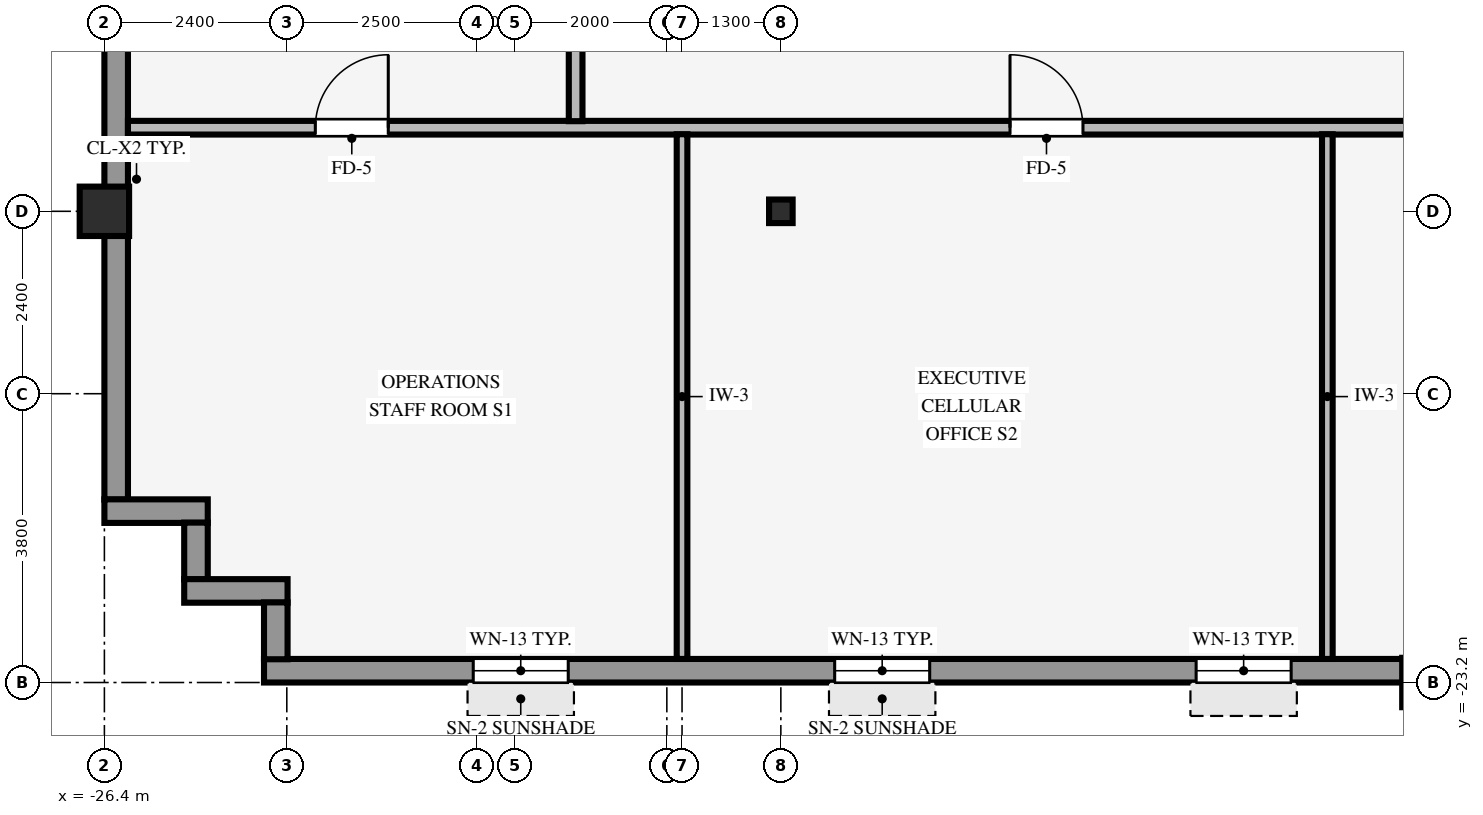
"""IFC4 building model, lengths in metres.
Left out: names, types, materials, properties, quantities, classifications, styles, units other than length and angle.
Written with IfcOpenShell. Run it as: python <this file> out.ifc"""

import sys

from ifc_helpers import new_model, si_unit, direction, frame, frame_2d, origin, origin_2d, place, context, subcontext, project, spatial, rectangle, hollow_rectangle, i_section, extrude, source, transform, mapped, element, fill, save


model = new_model("IFC4")
c1 = context("Model", 3, precision=1e-05, world=origin(), true_north=direction((0.0, 1.0)))
c2 = subcontext(c1, "Body", "Model", "MODEL_VIEW")
j1 = project(units=[si_unit("LENGTHUNIT", "METRE"), si_unit("PLANEANGLEUNIT", "RADIAN")], contexts=[c1])
p1 = place(None, origin())
s1 = spatial("IfcSite", under=j1, at=p1, CompositionType="ELEMENT")
p2 = place(p1, origin())
s2 = spatial("IfcBuilding", under=s1, at=p2, CompositionType="ELEMENT")
p3 = place(p2, frame((0.0, 0.0, 182.25)))
s3 = spatial("IfcBuildingStorey", under=s2, at=p3, CompositionType="ELEMENT", Elevation=182.25)
for number, where, z_axis, x_axis in (
    (1, (-26.4, -17.0, 0.0), (0.0, 0.0, 1.0), (1.0, 0.0, 0.0)),
    (2, (-9.0, -23.2, 0.0), (0.0, 0.0, 1.0), (1.0, 0.0, 0.0)),
):
    element("IfcColumn", number, at=place(p3, frame(where, z_axis=z_axis, x_axis=x_axis)), inside=s3, PredefinedType="COLUMN", context=c2, shape_type="SweptSolid", body=[
        extrude(hollow_rectangle(XDim=0.65, YDim=0.65, WallThickness=0.04, InnerFilletRadius=0.04, OuterFilletRadius=0.08, at=origin_2d()), origin(), (0.0, 0.0, 1.0), 3.25),
    ])
p4 = place(p3, frame((-17.5, -17.0, 0.0), z_axis=(0.0, 0.0, 1.0), x_axis=(1.0, 0.0, 0.0)))
e3 = element("IfcColumn", 3, at=p4, inside=s3, PredefinedType="COLUMN", context=c2, shape_type="SweptSolid", body=[
    extrude(i_section(OverallWidth=0.31, OverallDepth=0.31, WebThickness=0.015, FlangeThickness=0.015, FilletRadius=0.015, at=origin_2d()), origin(), (0.0, 0.0, 1.0), 3.25),
])
p5 = place(p3, frame((-24.3, -23.045, 0.0), z_axis=(0.0, 0.0, 1.0), x_axis=(1.0, 0.0, 0.0)))
e4 = element("IfcWall", 4, at=p5, inside=s3, PredefinedType="STANDARD", context=c2, shape_type="SweptSolid", body=[
    extrude(rectangle(XDim=44.8, YDim=0.31, at=frame_2d((22.4, 0.0))), origin(), (0.0, 0.0, 1.0), 2.585),
])
p6 = place(p5, frame((2.753, 0.0, 0.8)))
e5 = element("IfcOpeningElement", 5, at=p6, cuts=e4, PredefinedType="OPENING", context=c2, shape_type="SweptSolid", body=[
    extrude(rectangle(XDim=1.25, YDim=1.52, at=frame_2d((0.625, 0.76))), frame((0.0, 0.165, 0.0), z_axis=(0.0, -1.0, 0.0), x_axis=(1.0, 0.0, 0.0)), (0.0, 0.0, 1.0), 0.33),
])
p7 = place(p5, frame((7.508, 0.0, 0.8)))
e6 = element("IfcOpeningElement", 6, at=p7, cuts=e4, PredefinedType="OPENING", context=c2, shape_type="SweptSolid", body=[
    extrude(rectangle(XDim=1.25, YDim=1.52, at=frame_2d((0.625, 0.76))), frame((0.0, 0.165, 0.0), z_axis=(0.0, -1.0, 0.0), x_axis=(1.0, 0.0, 0.0)), (0.0, 0.0, 1.0), 0.33),
])
p8 = place(p5, frame((12.264, 0.0, 0.8)))
e7 = element("IfcOpeningElement", 7, at=p8, cuts=e4, PredefinedType="OPENING", context=c2, shape_type="SweptSolid", body=[
    extrude(rectangle(XDim=1.25, YDim=1.52, at=frame_2d((0.625, 0.76))), frame((0.0, 0.165, 0.0), z_axis=(0.0, -1.0, 0.0), x_axis=(1.0, 0.0, 0.0)), (0.0, 0.0, 1.0), 0.33),
])
p9 = place(p5, frame((17.019, 0.0, 0.8)))
e8 = element("IfcOpeningElement", 8, at=p9, cuts=e4, PredefinedType="OPENING", context=c2, shape_type="SweptSolid", body=[
    extrude(rectangle(XDim=1.25, YDim=1.52, at=frame_2d((0.625, 0.76))), frame((0.0, 0.165, 0.0), z_axis=(0.0, -1.0, 0.0), x_axis=(1.0, 0.0, 0.0)), (0.0, 0.0, 1.0), 0.33),
])
p10 = place(p5, frame((21.775, 0.0, 0.8)))
e9 = element("IfcOpeningElement", 9, at=p10, cuts=e4, PredefinedType="OPENING", context=c2, shape_type="SweptSolid", body=[
    extrude(rectangle(XDim=1.25, YDim=1.52, at=frame_2d((0.625, 0.76))), frame((0.0, 0.165, 0.0), z_axis=(0.0, -1.0, 0.0), x_axis=(1.0, 0.0, 0.0)), (0.0, 0.0, 1.0), 0.33),
])
p11 = place(p5, frame((26.531, 0.0, 0.8)))
e10 = element("IfcOpeningElement", 10, at=p11, cuts=e4, PredefinedType="OPENING", context=c2, shape_type="SweptSolid", body=[
    extrude(rectangle(XDim=1.25, YDim=1.52, at=frame_2d((0.625, 0.76))), frame((0.0, 0.165, 0.0), z_axis=(0.0, -1.0, 0.0), x_axis=(1.0, 0.0, 0.0)), (0.0, 0.0, 1.0), 0.33),
])
p12 = place(p5, frame((30.836, 0.0, 0.8)))
e11 = element("IfcOpeningElement", 11, at=p12, cuts=e4, PredefinedType="OPENING", context=c2, shape_type="SweptSolid", body=[
    extrude(rectangle(XDim=1.25, YDim=1.52, at=frame_2d((0.625, 0.76))), frame((0.0, 0.165, 0.0), z_axis=(0.0, -1.0, 0.0), x_axis=(1.0, 0.0, 0.0)), (0.0, 0.0, 1.0), 0.33),
])
p13 = place(p5, frame((36.042, 0.0, 0.8)))
e12 = element("IfcOpeningElement", 12, at=p13, cuts=e4, PredefinedType="OPENING", context=c2, shape_type="SweptSolid", body=[
    extrude(rectangle(XDim=1.25, YDim=1.52, at=frame_2d((0.625, 0.76))), frame((0.0, 0.165, 0.0), z_axis=(0.0, -1.0, 0.0), x_axis=(1.0, 0.0, 0.0)), (0.0, 0.0, 1.0), 0.33),
])
p14 = place(p5, frame((40.797, 0.0, 0.8)))
e13 = element("IfcOpeningElement", 13, at=p14, cuts=e4, PredefinedType="OPENING", context=c2, shape_type="SweptSolid", body=[
    extrude(rectangle(XDim=1.25, YDim=1.52, at=frame_2d((0.625, 0.76))), frame((0.0, 0.165, 0.0), z_axis=(0.0, -1.0, 0.0), x_axis=(1.0, 0.0, 0.0)), (0.0, 0.0, 1.0), 0.33),
])
p15 = place(p3, frame((-26.245, -20.794, 0.0), z_axis=(0.0, 0.0, 1.0), x_axis=(0.0, 1.0, 0.0)))
e14 = element("IfcWall", 14, at=p15, inside=s3, PredefinedType="STANDARD", context=c2, shape_type="SweptSolid", body=[
    extrude(rectangle(XDim=37.788, YDim=0.31, at=frame_2d((18.894, 0.0))), origin(), (0.0, 0.0, 1.0), 2.585),
])
p16 = place(p15, frame((7.644, 0.0, 0.8)))
e15 = element("IfcOpeningElement", 15, at=p16, cuts=e14, PredefinedType="OPENING", context=c2, shape_type="SweptSolid", body=[
    extrude(rectangle(XDim=2.05, YDim=1.52, at=frame_2d((1.025, 0.76))), frame((0.0, 0.165, 0.0), z_axis=(0.0, -1.0, 0.0), x_axis=(1.0, 0.0, 0.0)), (0.0, 0.0, 1.0), 0.33),
])
p17 = place(p15, frame((12.756, 0.0, 0.8)))
e16 = element("IfcOpeningElement", 16, at=p17, cuts=e14, PredefinedType="OPENING", context=c2, shape_type="SweptSolid", body=[
    extrude(rectangle(XDim=2.05, YDim=1.52, at=frame_2d((1.025, 0.76))), frame((0.0, 0.165, 0.0), z_axis=(0.0, -1.0, 0.0), x_axis=(1.0, 0.0, 0.0)), (0.0, 0.0, 1.0), 0.33),
])
p18 = place(p15, frame((17.869, 0.0, 0.8)))
e17 = element("IfcOpeningElement", 17, at=p18, cuts=e14, PredefinedType="OPENING", context=c2, shape_type="SweptSolid", body=[
    extrude(rectangle(XDim=2.05, YDim=1.52, at=frame_2d((1.025, 0.76))), frame((0.0, 0.165, 0.0), z_axis=(0.0, -1.0, 0.0), x_axis=(1.0, 0.0, 0.0)), (0.0, 0.0, 1.0), 0.33),
])
p19 = place(p15, frame((22.531, 0.0, 0.8)))
e18 = element("IfcOpeningElement", 18, at=p19, cuts=e14, PredefinedType="OPENING", context=c2, shape_type="SweptSolid", body=[
    extrude(rectangle(XDim=2.05, YDim=1.52, at=frame_2d((1.025, 0.76))), frame((0.0, 0.165, 0.0), z_axis=(0.0, -1.0, 0.0), x_axis=(1.0, 0.0, 0.0)), (0.0, 0.0, 1.0), 0.33),
])
p20 = place(p15, frame((27.194, 0.0, 0.8)))
e19 = element("IfcOpeningElement", 19, at=p20, cuts=e14, PredefinedType="OPENING", context=c2, shape_type="SweptSolid", body=[
    extrude(rectangle(XDim=2.05, YDim=1.52, at=frame_2d((1.025, 0.76))), frame((0.0, 0.165, 0.0), z_axis=(0.0, -1.0, 0.0), x_axis=(1.0, 0.0, 0.0)), (0.0, 0.0, 1.0), 0.33),
])
p21 = place(p15, frame((33.207, 0.0, 0.8)))
e20 = element("IfcOpeningElement", 20, at=p21, cuts=e14, PredefinedType="OPENING", context=c2, shape_type="SweptSolid", body=[
    extrude(rectangle(XDim=2.05, YDim=1.52, at=frame_2d((1.025, 0.76))), frame((0.0, 0.165, 0.0), z_axis=(0.0, -1.0, 0.0), x_axis=(1.0, 0.0, 0.0)), (0.0, 0.0, 1.0), 0.33),
])
p22 = place(p3, frame((-26.4, -20.945, 0.0), z_axis=(0.0, 0.0, 1.0), x_axis=(1.0, 0.0, 0.0)))
e21 = element("IfcWall", 21, at=p22, inside=s3, PredefinedType="STANDARD", context=c2, shape_type="SweptSolid", body=[
    extrude(rectangle(XDim=1.36, YDim=0.31, at=frame_2d((0.68, 0.0))), origin(), (0.0, 0.0, 1.0), 3.24),
])
p23 = place(p3, frame((-25.195, -21.844, 0.0), z_axis=(0.0, 0.0, 1.0), x_axis=(0.0, 1.0, 0.0)))
e22 = element("IfcWall", 22, at=p23, inside=s3, PredefinedType="STANDARD", context=c2, shape_type="SweptSolid", body=[
    extrude(rectangle(XDim=0.748, YDim=0.31, at=frame_2d((0.374, 0.0))), origin(), (0.0, 0.0, 1.0), 3.24),
])
p24 = place(p3, frame((-25.35, -21.995, 0.0), z_axis=(0.0, 0.0, 1.0), x_axis=(1.0, 0.0, 0.0)))
e23 = element("IfcWall", 23, at=p24, inside=s3, PredefinedType="STANDARD", context=c2, shape_type="SweptSolid", body=[
    extrude(rectangle(XDim=1.36, YDim=0.31, at=frame_2d((0.68, 0.0))), origin(), (0.0, 0.0, 1.0), 3.24),
])
p25 = place(p3, frame((-24.145, -22.894, 0.0), z_axis=(0.0, 0.0, 1.0), x_axis=(0.0, 1.0, 0.0)))
e24 = element("IfcWall", 24, at=p25, inside=s3, PredefinedType="STANDARD", context=c2, shape_type="SweptSolid", body=[
    extrude(rectangle(XDim=0.748, YDim=0.31, at=frame_2d((0.374, 0.0))), origin(), (0.0, 0.0, 1.0), 3.24),
])
p26 = place(p3, frame((-26.09, -15.9, 0.0), z_axis=(0.0, 0.0, 1.0), x_axis=(1.0, 0.0, 0.0)))
e25 = element("IfcWall", 25, at=p26, inside=s3, PredefinedType="PARTITIONING", context=c2, shape_type="SweptSolid", body=[
    extrude(rectangle(XDim=48.38, YDim=0.18, at=frame_2d((24.19, 0.0))), origin(), (0.0, 0.0, 1.0), 3.24),
])
p27 = place(p26, frame((40.51, 0.0, 0.0)))
e26 = element("IfcOpeningElement", 26, at=p27, cuts=e25, PredefinedType="OPENING", context=c2, shape_type="SweptSolid", body=[
    extrude(rectangle(XDim=0.96, YDim=2.1, at=frame_2d((0.48, 1.05))), frame((0.0, 0.1, 0.0), z_axis=(0.0, -1.0, 0.0), x_axis=(1.0, 0.0, 0.0)), (0.0, 0.0, 1.0), 0.2),
])
p28 = place(p26, frame((19.995, 0.0, 0.0)))
e27 = element("IfcOpeningElement", 27, at=p28, cuts=e25, PredefinedType="OPENING", context=c2, shape_type="SweptSolid", body=[
    extrude(rectangle(XDim=0.96, YDim=2.1, at=frame_2d((0.48, 1.05))), frame((0.0, 0.1, 0.0), z_axis=(0.0, -1.0, 0.0), x_axis=(1.0, 0.0, 0.0)), (0.0, 0.0, 1.0), 0.2),
])
p29 = place(p26, frame((28.45, 0.0, 0.0)))
e28 = element("IfcOpeningElement", 28, at=p29, cuts=e25, PredefinedType="OPENING", context=c2, shape_type="SweptSolid", body=[
    extrude(rectangle(XDim=0.96, YDim=2.1, at=frame_2d((0.48, 1.05))), frame((0.0, 0.1, 0.0), z_axis=(0.0, -1.0, 0.0), x_axis=(1.0, 0.0, 0.0)), (0.0, 0.0, 1.0), 0.2),
])
p30 = place(p26, frame((11.605, 0.0, 0.0)))
e29 = element("IfcOpeningElement", 29, at=p30, cuts=e25, PredefinedType="OPENING", context=c2, shape_type="SweptSolid", body=[
    extrude(rectangle(XDim=0.96, YDim=2.1, at=frame_2d((0.48, 1.05))), frame((0.0, 0.1, 0.0), z_axis=(0.0, -1.0, 0.0), x_axis=(1.0, 0.0, 0.0)), (0.0, 0.0, 1.0), 0.2),
])
p31 = place(p26, frame((2.465, 0.0, 0.0)))
e30 = element("IfcOpeningElement", 30, at=p31, cuts=e25, PredefinedType="OPENING", context=c2, shape_type="SweptSolid", body=[
    extrude(rectangle(XDim=0.96, YDim=2.1, at=frame_2d((0.48, 1.05))), frame((0.0, 0.1, 0.0), z_axis=(0.0, -1.0, 0.0), x_axis=(1.0, 0.0, 0.0)), (0.0, 0.0, 1.0), 0.2),
])
p32 = place(p3, frame((-20.2, -15.814, 0.0), z_axis=(0.0, 0.0, 1.0), x_axis=(0.0, 1.0, 0.0)))
e31 = element("IfcWall", 31, at=p32, inside=s3, PredefinedType="PARTITIONING", context=c2, shape_type="SweptSolid", body=[
    extrude(rectangle(XDim=31.628, YDim=0.18, at=frame_2d((15.814, 0.0))), origin(), (0.0, 0.0, 1.0), 3.24),
])
p33 = place(p32, frame((10.684, 0.0, 0.0)))
e32 = element("IfcOpeningElement", 32, at=p33, cuts=e31, PredefinedType="OPENING", context=c2, shape_type="SweptSolid", body=[
    extrude(rectangle(XDim=0.96, YDim=2.1, at=frame_2d((0.48, 1.05))), frame((0.0, 0.1, 0.0), z_axis=(0.0, -1.0, 0.0), x_axis=(1.0, 0.0, 0.0)), (0.0, 0.0, 1.0), 0.2),
])
p34 = place(p32, frame((24.184, 0.0, 0.0)))
e33 = element("IfcOpeningElement", 33, at=p34, cuts=e31, PredefinedType="OPENING", context=c2, shape_type="SweptSolid", body=[
    extrude(rectangle(XDim=0.96, YDim=2.1, at=frame_2d((0.48, 1.05))), frame((0.0, 0.1, 0.0), z_axis=(0.0, -1.0, 0.0), x_axis=(1.0, 0.0, 0.0)), (0.0, 0.0, 1.0), 0.2),
])
for number, where, z_axis, x_axis in (
    (34, (-18.8, -22.89, 0.0), (0.0, 0.0, 1.0), (0.0, 1.0, 0.0)),
    (35, (-10.31, -22.89, 0.0), (0.0, 0.0, 1.0), (0.0, 1.0, 0.0)),
):
    element("IfcWall", number, at=place(p3, frame(where, z_axis=z_axis, x_axis=x_axis)), inside=s3, PredefinedType="PARTITIONING", context=c2, shape_type="SweptSolid", body=[
        extrude(rectangle(XDim=6.904, YDim=0.14, at=frame_2d((3.452, 0.0))), origin(), (0.0, 0.0, 1.0), 3.24),
    ])
m1 = source(origin(), c2, "Body", "SweptSolid", [
    extrude(rectangle(XDim=1.25, YDim=1.52, at=frame_2d((0.625, 0.76))), frame((0.0, 0.03, 0.0), z_axis=(0.0, -1.0, 0.0), x_axis=(1.0, 0.0, 0.0)), (0.0, 0.0, 1.0), 0.06),
])
p35 = place(p6, origin())
e36 = element("IfcWindow", 36, at=p35, inside=s3, PartitioningType="SINGLE_PANEL", PredefinedType="WINDOW", context=c2, shape_type="MappedRepresentation", body=[
    mapped(m1, transform((0.0, 0.0, 0.0), scale=1.0)),
])
fill(e5, e36)
p36 = place(p7, origin())
e37 = element("IfcWindow", 37, at=p36, inside=s3, PartitioningType="SINGLE_PANEL", PredefinedType="WINDOW", context=c2, shape_type="MappedRepresentation", body=[
    mapped(m1, transform((0.0, 0.0, 0.0), scale=1.0)),
])
fill(e6, e37)
p37 = place(p8, origin())
e38 = element("IfcWindow", 38, at=p37, inside=s3, PartitioningType="SINGLE_PANEL", PredefinedType="WINDOW", context=c2, shape_type="MappedRepresentation", body=[
    mapped(m1, transform((0.0, 0.0, 0.0), scale=1.0)),
])
fill(e7, e38)
m2 = source(origin(), c2, "Body", "SweptSolid", [
    extrude(rectangle(XDim=0.96, YDim=2.1, at=frame_2d((0.48, 1.05))), frame((0.0, 0.025, 0.0), z_axis=(0.0, -1.0, 0.0), x_axis=(1.0, 0.0, 0.0)), (0.0, 0.0, 1.0), 0.05),
])
p38 = place(p30, origin())
e39 = element("IfcDoor", 39, at=p38, inside=s3, OperationType="SINGLE_SWING_LEFT", PredefinedType="DOOR", context=c2, shape_type="MappedRepresentation", body=[
    mapped(m2, transform((0.0, 0.0, 0.0), scale=1.0)),
])
fill(e29, e39)
p39 = place(p31, origin())
e40 = element("IfcDoor", 40, at=p39, inside=s3, OperationType="SINGLE_SWING_RIGHT", PredefinedType="DOOR", context=c2, shape_type="MappedRepresentation", body=[
    mapped(m2, transform((0.0, 0.0, 0.0), scale=1.0)),
])
fill(e30, e40)
save(model, sys.argv[1])
